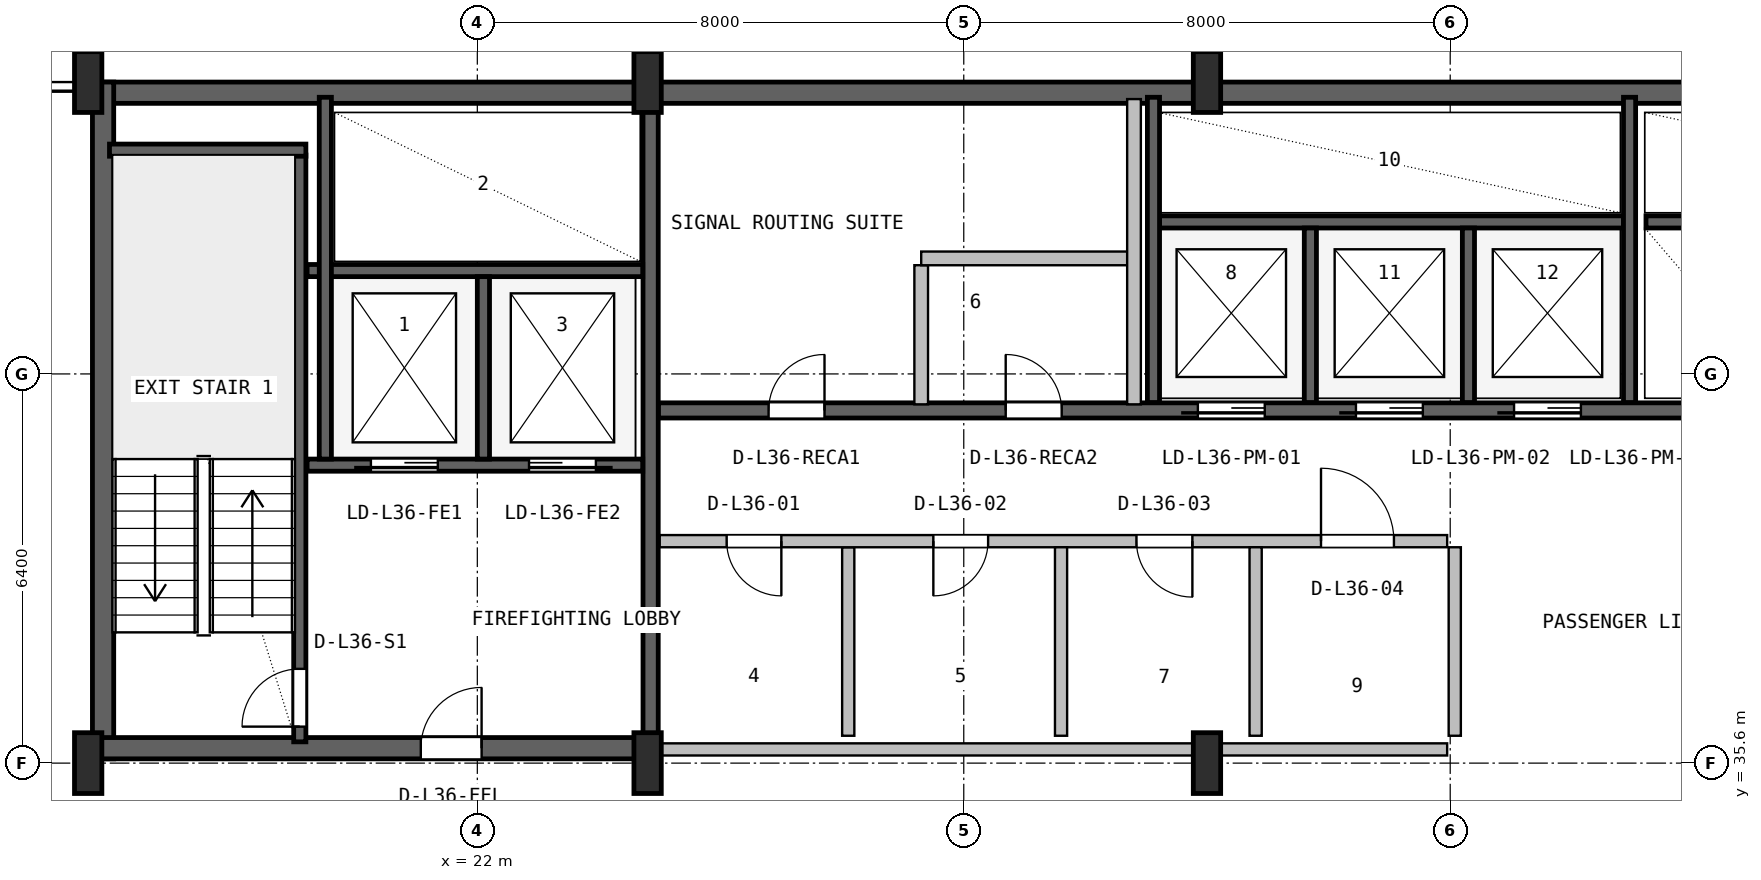
"""IFC4 building model, lengths in metres.
Left out: names, types, materials, properties, quantities, classifications, styles, units other than length and angle.
Written with IfcOpenShell. Run it as: python <this file> out.ifc"""

import sys

from ifc_helpers import new_model, si_unit, direction, frame, frame_2d, origin, origin_2d, place, context, subcontext, project, spatial, rectangle, i_section, extrude, source, transform, mapped, element, fill, save


model = new_model("IFC4")
c1 = context("Model", 3, precision=1e-05, world=origin(), true_north=direction((0.0, 1.0)))
c2 = subcontext(c1, "Body", "Model", "MODEL_VIEW")
j1 = project(units=[si_unit("LENGTHUNIT", "METRE"), si_unit("PLANEANGLEUNIT", "RADIAN")], contexts=[c1])
p1 = place(None, origin())
s1 = spatial("IfcSite", under=j1, at=p1, CompositionType="ELEMENT")
p2 = place(p1, origin())
s2 = spatial("IfcBuilding", under=s1, at=p2, CompositionType="ELEMENT")
p3 = place(p2, frame((0.0, 0.0, 149.6)))
s3 = spatial("IfcBuildingStorey", under=s2, at=p3, CompositionType="ELEMENT", Elevation=149.6)
p4 = place(p3, frame((15.6, 46.625, 0.0), z_axis=(0.0, 0.0, 1.0), x_axis=(1.0, 0.0, 0.0)))
e1 = element("IfcWall", 1, at=p4, inside=s3, PredefinedType="SHEAR", context=c2, shape_type="SweptSolid", body=[
    extrude(rectangle(XDim=36.8, YDim=0.35, at=frame_2d((18.4, 0.0))), origin(), (0.0, 0.0, 1.0), 3.55),
])
p5 = place(p3, frame((15.845, 35.67, 0.0), z_axis=(0.0, 0.0, 1.0), x_axis=(0.0, 1.0, 0.0)))
e2 = element("IfcWall", 2, at=p5, inside=s3, PredefinedType="SHEAR", context=c2, shape_type="SweptSolid", body=[
    extrude(rectangle(XDim=11.13, YDim=0.35, at=frame_2d((5.565, 0.0))), origin(), (0.0, 0.0, 1.0), 3.55),
])
p6 = place(p3, frame((15.67, 35.845, 0.0), z_axis=(0.0, 0.0, 1.0), x_axis=(1.0, 0.0, 0.0)))
e3 = element("IfcWall", 3, at=p6, inside=s3, PredefinedType="SHEAR", context=c2, shape_type="SweptSolid", body=[
    extrude(rectangle(XDim=9.13, YDim=0.35, at=frame_2d((4.565, 0.0))), origin(), (0.0, 0.0, 1.0), 3.55),
])
p7 = place(p6, frame((5.4, 0.0, 0.0)))
e4 = element("IfcOpeningElement", 4, at=p7, cuts=e3, PredefinedType="OPENING", context=c2, shape_type="SweptSolid", body=[
    extrude(rectangle(XDim=1.0, YDim=2.1, at=frame_2d((0.5, 1.05))), frame((0.0, 0.185, 0.0), z_axis=(0.0, -1.0, 0.0), x_axis=(1.0, 0.0, 0.0)), (0.0, 0.0, 1.0), 0.37),
])
m1 = source(origin(), c2, "Body", "SweptSolid", [
    extrude(i_section(OverallWidth=0.45, OverallDepth=1.0, WebThickness=0.016, FlangeThickness=0.03, FilletRadius=0.016, at=origin_2d()), origin(), (0.0, 0.0, 1.0), 3.8),
])
for number, where, z_axis, x_axis in (
    (5, (15.6, 35.6, 0.0), (0.0, 0.0, 1.0), (1.0, 0.0, 0.0)),
    (6, (15.6, 46.8, 0.0), (0.0, 0.0, 1.0), (1.0, 0.0, 0.0)),
    (7, (24.8, 35.6, 0.0), (0.0, 0.0, 1.0), (1.0, 0.0, 0.0)),
    (8, (24.8, 46.8, 0.0), (0.0, 0.0, 1.0), (1.0, 0.0, 0.0)),
    (9, (34.0, 35.6, 0.0), (0.0, 0.0, 1.0), (1.0, 0.0, 0.0)),
    (10, (34.0, 46.8, 0.0), (0.0, 0.0, 1.0), (1.0, 0.0, 0.0)),
):
    element("IfcColumn", number, at=place(p3, frame(where, z_axis=z_axis, x_axis=x_axis)), inside=s3, PredefinedType="COLUMN", context=c2, shape_type="MappedRepresentation", body=[
        mapped(m1, transform((0.0, 0.0, 0.0), x_axis=(1.0, 0.0, 0.0), y_axis=(0.0, 1.0, 0.0), z_axis=(0.0, 0.0, 1.0), scale=1.0)),
    ])
p8 = place(p3, frame((19.08, 35.95, 0.0), z_axis=(0.0, 0.0, 1.0), x_axis=(0.0, 1.0, 0.0)))
e11 = element("IfcWall", 11, at=p8, inside=s3, PredefinedType="SHEAR", context=c2, shape_type="SweptSolid", body=[
    extrude(rectangle(XDim=9.65, YDim=0.2, at=frame_2d((4.825, 0.0))), origin(), (0.0, 0.0, 1.0), 3.55),
])
p9 = place(p8, frame((0.25, 0.0, 0.0)))
e12 = element("IfcOpeningElement", 12, at=p9, cuts=e11, PredefinedType="OPENING", context=c2, shape_type="SweptSolid", body=[
    extrude(rectangle(XDim=0.95, YDim=2.1, at=frame_2d((0.475, 1.05))), frame((0.0, 0.11, 0.0), z_axis=(0.0, -1.0, 0.0), x_axis=(1.0, 0.0, 0.0)), (0.0, 0.0, 1.0), 0.22),
])
p10 = place(p3, frame((15.95, 45.68, 0.0), z_axis=(0.0, 0.0, 1.0), x_axis=(1.0, 0.0, 0.0)))
e13 = element("IfcWall", 13, at=p10, inside=s3, PredefinedType="SHEAR", context=c2, shape_type="SweptSolid", body=[
    extrude(rectangle(XDim=3.23, YDim=0.2, at=frame_2d((1.615, 0.0))), origin(), (0.0, 0.0, 1.0), 3.55),
])
p11 = place(p3, frame((24.85, 36.05, 0.0), z_axis=(0.0, 0.0, 1.0), x_axis=(0.0, 1.0, 0.0)))
e14 = element("IfcWall", 14, at=p11, inside=s3, PredefinedType="SHEAR", context=c2, shape_type="SweptSolid", body=[
    extrude(rectangle(XDim=10.45, YDim=0.25, at=frame_2d((5.225, 0.0))), origin(), (0.0, 0.0, 1.0), 3.55),
])
p12 = place(p3, frame((19.2, 40.5, 0.0), z_axis=(0.0, 0.0, 1.0), x_axis=(1.0, 0.0, 0.0)))
e15 = element("IfcWall", 15, at=p12, inside=s3, PredefinedType="SHEAR", context=c2, shape_type="SweptSolid", body=[
    extrude(rectangle(XDim=5.52, YDim=0.2, at=frame_2d((2.76, 0.0))), origin(), (0.0, 0.0, 1.0), 3.55),
])
p13 = place(p12, frame((1.05, 0.0, 0.0)))
e16 = element("IfcOpeningElement", 16, at=p13, cuts=e15, PredefinedType="OPENING", context=c2, shape_type="SweptSolid", body=[
    extrude(rectangle(XDim=1.1, YDim=2.18, at=frame_2d((0.55, 1.09))), frame((0.0, 0.11, 0.0), z_axis=(0.0, -1.0, 0.0), x_axis=(1.0, 0.0, 0.0)), (0.0, 0.0, 1.0), 0.22),
])
p14 = place(p12, frame((3.65, 0.0, 0.0)))
e17 = element("IfcOpeningElement", 17, at=p14, cuts=e15, PredefinedType="OPENING", context=c2, shape_type="SweptSolid", body=[
    extrude(rectangle(XDim=1.1, YDim=2.18, at=frame_2d((0.55, 1.09))), frame((0.0, 0.11, 0.0), z_axis=(0.0, -1.0, 0.0), x_axis=(1.0, 0.0, 0.0)), (0.0, 0.0, 1.0), 0.22),
])
p15 = place(p3, frame((19.2, 43.7, 0.0), z_axis=(0.0, 0.0, 1.0), x_axis=(1.0, 0.0, 0.0)))
e18 = element("IfcWall", 18, at=p15, inside=s3, PredefinedType="SHEAR", context=c2, shape_type="SweptSolid", body=[
    extrude(rectangle(XDim=5.52, YDim=0.2, at=frame_2d((2.76, 0.0))), origin(), (0.0, 0.0, 1.0), 3.55),
])
p16 = place(p3, frame((22.1, 40.6, 0.0), z_axis=(0.0, 0.0, 1.0), x_axis=(0.0, 1.0, 0.0)))
e19 = element("IfcWall", 19, at=p16, inside=s3, PredefinedType="SHEAR", context=c2, shape_type="SweptSolid", body=[
    extrude(rectangle(XDim=3.0, YDim=0.2, at=frame_2d((1.5, 0.0))), origin(), (0.0, 0.0, 1.0), 3.55),
])
p17 = place(p3, frame((19.5, 40.6, 0.0), z_axis=(0.0, 0.0, 1.0), x_axis=(0.0, 1.0, 0.0)))
e20 = element("IfcWall", 20, at=p17, inside=s3, PredefinedType="SHEAR", context=c2, shape_type="SweptSolid", body=[
    extrude(rectangle(XDim=5.95, YDim=0.2, at=frame_2d((2.975, 0.0))), origin(), (0.0, 0.0, 1.0), 3.55),
])
p18 = place(p3, frame((24.98, 41.4, 0.0), z_axis=(0.0, 0.0, 1.0), x_axis=(1.0, 0.0, 0.0)))
e21 = element("IfcWall", 21, at=p18, inside=s3, PredefinedType="SHEAR", context=c2, shape_type="SweptSolid", body=[
    extrude(rectangle(XDim=23.82, YDim=0.25, at=frame_2d((11.91, 0.0))), origin(), (0.0, 0.0, 1.0), 3.55),
])
p19 = place(p18, frame((8.87, 0.0, 0.0)))
e22 = element("IfcOpeningElement", 22, at=p19, cuts=e21, PredefinedType="OPENING", context=c2, shape_type="SweptSolid", body=[
    extrude(rectangle(XDim=1.1, YDim=2.18, at=frame_2d((0.55, 1.09))), frame((0.0, 0.135, 0.0), z_axis=(0.0, -1.0, 0.0), x_axis=(1.0, 0.0, 0.0)), (0.0, 0.0, 1.0), 0.27),
])
p20 = place(p18, frame((11.47, 0.0, 0.0)))
e23 = element("IfcOpeningElement", 23, at=p20, cuts=e21, PredefinedType="OPENING", context=c2, shape_type="SweptSolid", body=[
    extrude(rectangle(XDim=1.1, YDim=2.18, at=frame_2d((0.55, 1.09))), frame((0.0, 0.135, 0.0), z_axis=(0.0, -1.0, 0.0), x_axis=(1.0, 0.0, 0.0)), (0.0, 0.0, 1.0), 0.27),
])
p21 = place(p18, frame((14.07, 0.0, 0.0)))
e24 = element("IfcOpeningElement", 24, at=p21, cuts=e21, PredefinedType="OPENING", context=c2, shape_type="SweptSolid", body=[
    extrude(rectangle(XDim=1.1, YDim=2.18, at=frame_2d((0.55, 1.09))), frame((0.0, 0.135, 0.0), z_axis=(0.0, -1.0, 0.0), x_axis=(1.0, 0.0, 0.0)), (0.0, 0.0, 1.0), 0.27),
])
p22 = place(p18, frame((1.81, 0.0, 0.0)))
e25 = element("IfcOpeningElement", 25, at=p22, cuts=e21, PredefinedType="OPENING", context=c2, shape_type="SweptSolid", body=[
    extrude(rectangle(XDim=0.92, YDim=2.08, at=frame_2d((0.46, 1.04))), frame((0.0, 0.135, 0.0), z_axis=(0.0, -1.0, 0.0), x_axis=(1.0, 0.0, 0.0)), (0.0, 0.0, 1.0), 0.27),
])
p23 = place(p18, frame((5.71, 0.0, 0.0)))
e26 = element("IfcOpeningElement", 26, at=p23, cuts=e21, PredefinedType="OPENING", context=c2, shape_type="SweptSolid", body=[
    extrude(rectangle(XDim=0.92, YDim=2.08, at=frame_2d((0.46, 1.04))), frame((0.0, 0.135, 0.0), z_axis=(0.0, -1.0, 0.0), x_axis=(1.0, 0.0, 0.0)), (0.0, 0.0, 1.0), 0.27),
])
p24 = place(p3, frame((33.22, 44.5, 0.0), z_axis=(0.0, 0.0, 1.0), x_axis=(1.0, 0.0, 0.0)))
e27 = element("IfcWall", 27, at=p24, inside=s3, PredefinedType="SHEAR", context=c2, shape_type="SweptSolid", body=[
    extrude(rectangle(XDim=7.63, YDim=0.2, at=frame_2d((3.815, 0.0))), origin(), (0.0, 0.0, 1.0), 3.55),
])
p25 = place(p3, frame((33.12, 41.53, 0.0), z_axis=(0.0, 0.0, 1.0), x_axis=(0.0, 1.0, 0.0)))
e28 = element("IfcWall", 28, at=p25, inside=s3, PredefinedType="SHEAR", context=c2, shape_type="SweptSolid", body=[
    extrude(rectangle(XDim=5.02, YDim=0.2, at=frame_2d((2.51, 0.0))), origin(), (0.0, 0.0, 1.0), 3.55),
])
for number, where, z_axis, x_axis in (
    (29, (35.7, 41.53, 0.0), (0.0, 0.0, 1.0), (0.0, 1.0, 0.0)),
    (30, (38.3, 41.53, 0.0), (0.0, 0.0, 1.0), (0.0, 1.0, 0.0)),
):
    element("IfcWall", number, at=place(p3, frame(where, z_axis=z_axis, x_axis=x_axis)), inside=s3, PredefinedType="SHEAR", context=c2, shape_type="SweptSolid", body=[
        extrude(rectangle(XDim=2.87, YDim=0.2, at=frame_2d((1.435, 0.0))), origin(), (0.0, 0.0, 1.0), 3.55),
    ])
p26 = place(p3, frame((40.95, 41.53, 0.0), z_axis=(0.0, 0.0, 1.0), x_axis=(0.0, 1.0, 0.0)))
e31 = element("IfcWall", 31, at=p26, inside=s3, PredefinedType="SHEAR", context=c2, shape_type="SweptSolid", body=[
    extrude(rectangle(XDim=5.02, YDim=0.2, at=frame_2d((2.51, 0.0))), origin(), (0.0, 0.0, 1.0), 3.55),
])
p27 = place(p3, frame((41.22, 44.5, 0.0), z_axis=(0.0, 0.0, 1.0), x_axis=(1.0, 0.0, 0.0)))
e32 = element("IfcWall", 32, at=p27, inside=s3, PredefinedType="SHEAR", context=c2, shape_type="SweptSolid", body=[
    extrude(rectangle(XDim=7.58, YDim=0.2, at=frame_2d((3.79, 0.0))), origin(), (0.0, 0.0, 1.0), 3.55),
])
p28 = place(p3, frame((25.0, 35.825, 0.0), z_axis=(0.0, 0.0, 1.0), x_axis=(1.0, 0.0, 0.0)))
e33 = element("IfcWall", 33, at=p28, inside=s3, PredefinedType="SOLIDWALL", context=c2, shape_type="SweptSolid", body=[
    extrude(rectangle(XDim=12.95, YDim=0.2, at=frame_2d((6.475, 0.0))), origin(), (0.0, 0.0, 1.0), 2.575),
])
p29 = place(p3, frame((28.1, 36.05, 0.0), z_axis=(0.0, 0.0, 1.0), x_axis=(0.0, 1.0, 0.0)))
e34 = element("IfcWall", 34, at=p29, inside=s3, PredefinedType="PLUMBINGWALL", context=c2, shape_type="SweptSolid", body=[
    extrude(rectangle(XDim=3.1, YDim=0.2, at=frame_2d((1.55, 0.0))), origin(), (0.0, 0.0, 1.0), 3.53),
])
p30 = place(p3, frame((25.0, 39.25, 0.0), z_axis=(0.0, 0.0, 1.0), x_axis=(1.0, 0.0, 0.0)))
e35 = element("IfcWall", 35, at=p30, inside=s3, PredefinedType="SOLIDWALL", context=c2, shape_type="SweptSolid", body=[
    extrude(rectangle(XDim=12.95, YDim=0.2, at=frame_2d((6.475, 0.0))), origin(), (0.0, 0.0, 1.0), 3.53),
])
p31 = place(p30, frame((1.1, 0.0, 0.0)))
e36 = element("IfcOpeningElement", 36, at=p31, cuts=e35, PredefinedType="OPENING", context=c2, shape_type="SweptSolid", body=[
    extrude(rectangle(XDim=0.9, YDim=2.06, at=frame_2d((0.45, 1.03))), frame((0.0, 0.11, 0.0), z_axis=(0.0, -1.0, 0.0), x_axis=(1.0, 0.0, 0.0)), (0.0, 0.0, 1.0), 0.22),
])
p32 = place(p30, frame((4.5, 0.0, 0.0)))
e37 = element("IfcOpeningElement", 37, at=p32, cuts=e35, PredefinedType="OPENING", context=c2, shape_type="SweptSolid", body=[
    extrude(rectangle(XDim=0.9, YDim=2.06, at=frame_2d((0.45, 1.03))), frame((0.0, 0.11, 0.0), z_axis=(0.0, -1.0, 0.0), x_axis=(1.0, 0.0, 0.0)), (0.0, 0.0, 1.0), 0.22),
])
p33 = place(p30, frame((7.84, 0.0, 0.0)))
e38 = element("IfcOpeningElement", 38, at=p33, cuts=e35, PredefinedType="OPENING", context=c2, shape_type="SweptSolid", body=[
    extrude(rectangle(XDim=0.92, YDim=2.08, at=frame_2d((0.46, 1.04))), frame((0.0, 0.11, 0.0), z_axis=(0.0, -1.0, 0.0), x_axis=(1.0, 0.0, 0.0)), (0.0, 0.0, 1.0), 0.22),
])
p34 = place(p30, frame((10.875, 0.0, 0.0)))
e39 = element("IfcOpeningElement", 39, at=p34, cuts=e35, PredefinedType="OPENING", context=c2, shape_type="SweptSolid", body=[
    extrude(rectangle(XDim=1.2, YDim=2.1, at=frame_2d((0.6, 1.05))), frame((0.0, 0.11, 0.0), z_axis=(0.0, -1.0, 0.0), x_axis=(1.0, 0.0, 0.0)), (0.0, 0.0, 1.0), 0.22),
])
p35 = place(p3, frame((31.6, 36.05, 0.0), z_axis=(0.0, 0.0, 1.0), x_axis=(0.0, 1.0, 0.0)))
e40 = element("IfcWall", 40, at=p35, inside=s3, PredefinedType="PLUMBINGWALL", context=c2, shape_type="SweptSolid", body=[
    extrude(rectangle(XDim=3.1, YDim=0.2, at=frame_2d((1.55, 0.0))), origin(), (0.0, 0.0, 1.0), 3.53),
])
for number, where, z_axis, x_axis in (
    (41, (34.8, 36.05, 0.0), (0.0, 0.0, 1.0), (0.0, 1.0, 0.0)),
    (42, (38.075, 36.05, 0.0), (0.0, 0.0, 1.0), (0.0, 1.0, 0.0)),
):
    element("IfcWall", number, at=place(p3, frame(where, z_axis=z_axis, x_axis=x_axis)), inside=s3, PredefinedType="SOLIDWALL", context=c2, shape_type="SweptSolid", body=[
        extrude(rectangle(XDim=3.1, YDim=0.2, at=frame_2d((1.55, 0.0))), origin(), (0.0, 0.0, 1.0), 3.53),
    ])
p36 = place(p3, frame((29.3, 41.5, 0.0), z_axis=(0.0, 0.0, 1.0), x_axis=(0.0, 1.0, 0.0)))
e43 = element("IfcWall", 43, at=p36, inside=s3, PredefinedType="PARTITIONING", context=c2, shape_type="SweptSolid", body=[
    extrude(rectangle(XDim=2.288, YDim=0.225, at=frame_2d((1.144, 0.0))), origin(), (0.0, 0.0, 1.0), 3.53),
])
p37 = place(p3, frame((29.3, 43.9, 0.0), z_axis=(0.0, 0.0, 1.0), x_axis=(1.0, 0.0, 0.0)))
e44 = element("IfcWall", 44, at=p37, inside=s3, PredefinedType="PARTITIONING", context=c2, shape_type="SweptSolid", body=[
    extrude(rectangle(XDim=3.5, YDim=0.225, at=frame_2d((1.75, 0.0))), origin(), (0.0, 0.0, 1.0), 3.53),
])
p38 = place(p3, frame((32.8, 41.5, 0.0), z_axis=(0.0, 0.0, 1.0), x_axis=(0.0, 1.0, 0.0)))
e45 = element("IfcWall", 45, at=p38, inside=s3, PredefinedType="PARTITIONING", context=c2, shape_type="SweptSolid", body=[
    extrude(rectangle(XDim=5.02, YDim=0.225, at=frame_2d((2.51, 0.0))), origin(), (0.0, 0.0, 1.0), 3.53),
])
m2 = source(origin(), c2, "Body", "SweptSolid", [
    extrude(rectangle(XDim=0.95, YDim=2.1, at=frame_2d((0.475, 1.05))), frame((0.0, 0.025, 0.0), z_axis=(0.0, -1.0, 0.0), x_axis=(1.0, 0.0, 0.0)), (0.0, 0.0, 1.0), 0.05),
])
p39 = place(p9, origin())
e46 = element("IfcDoor", 46, at=p39, inside=s3, OperationType="SINGLE_SWING_LEFT", PredefinedType="DOOR", context=c2, shape_type="MappedRepresentation", body=[
    mapped(m2, transform((0.0, 0.0, 0.0), x_axis=(1.0, 0.0, 0.0), y_axis=(0.0, 1.0, 0.0), z_axis=(0.0, 0.0, 1.0), scale=1.0)),
])
fill(e12, e46)
m3 = source(origin(), c2, "Body", "SweptSolid", [
    extrude(rectangle(XDim=1.0, YDim=2.1, at=frame_2d((0.5, 1.05))), frame((0.0, 0.025, 0.0), z_axis=(0.0, -1.0, 0.0), x_axis=(1.0, 0.0, 0.0)), (0.0, 0.0, 1.0), 0.05),
])
p40 = place(p7, origin())
e47 = element("IfcDoor", 47, at=p40, inside=s3, OperationType="SINGLE_SWING_RIGHT", PredefinedType="DOOR", context=c2, shape_type="MappedRepresentation", body=[
    mapped(m3, transform((0.0, 0.0, 0.0), x_axis=(1.0, 0.0, 0.0), y_axis=(0.0, 1.0, 0.0), z_axis=(0.0, 0.0, 1.0), scale=1.0)),
])
fill(e4, e47)
m4 = source(origin(), c2, "Body", "SweptSolid", [
    extrude(rectangle(XDim=1.1, YDim=2.18, at=frame_2d((0.55, 1.09))), frame((0.0, 0.025, 0.0), z_axis=(0.0, -1.0, 0.0), x_axis=(1.0, 0.0, 0.0)), (0.0, 0.0, 1.0), 0.05),
])
p41 = place(p13, frame((1.1, 0.0, 0.0), z_axis=(0.0, 0.0, 1.0), x_axis=(-1.0, 0.0, 0.0)))
e48 = element("IfcDoor", 48, at=p41, inside=s3, OperationType="SLIDING_TO_LEFT", PredefinedType="DOOR", context=c2, shape_type="MappedRepresentation", body=[
    mapped(m4, transform((0.0, 0.0, 0.0), x_axis=(1.0, 0.0, 0.0), y_axis=(0.0, 1.0, 0.0), z_axis=(0.0, 0.0, 1.0), scale=1.0)),
])
fill(e16, e48)
p42 = place(p14, frame((1.1, 0.0, 0.0), z_axis=(0.0, 0.0, 1.0), x_axis=(-1.0, 0.0, 0.0)))
e49 = element("IfcDoor", 49, at=p42, inside=s3, OperationType="SLIDING_TO_RIGHT", PredefinedType="DOOR", context=c2, shape_type="MappedRepresentation", body=[
    mapped(m4, transform((0.0, 0.0, 0.0), x_axis=(1.0, 0.0, 0.0), y_axis=(0.0, 1.0, 0.0), z_axis=(0.0, 0.0, 1.0), scale=1.0)),
])
fill(e17, e49)
p43 = place(p19, frame((1.1, 0.0, 0.0), z_axis=(0.0, 0.0, 1.0), x_axis=(-1.0, 0.0, 0.0)))
e50 = element("IfcDoor", 50, at=p43, inside=s3, OperationType="SLIDING_TO_LEFT", PredefinedType="DOOR", context=c2, shape_type="MappedRepresentation", body=[
    mapped(m4, transform((0.0, 0.0, 0.0), x_axis=(1.0, 0.0, 0.0), y_axis=(0.0, 1.0, 0.0), z_axis=(0.0, 0.0, 1.0), scale=1.0)),
])
fill(e22, e50)
p44 = place(p20, frame((1.1, 0.0, 0.0), z_axis=(0.0, 0.0, 1.0), x_axis=(-1.0, 0.0, 0.0)))
e51 = element("IfcDoor", 51, at=p44, inside=s3, OperationType="SLIDING_TO_LEFT", PredefinedType="DOOR", context=c2, shape_type="MappedRepresentation", body=[
    mapped(m4, transform((0.0, 0.0, 0.0), x_axis=(1.0, 0.0, 0.0), y_axis=(0.0, 1.0, 0.0), z_axis=(0.0, 0.0, 1.0), scale=1.0)),
])
fill(e23, e51)
p45 = place(p21, frame((1.1, 0.0, 0.0), z_axis=(0.0, 0.0, 1.0), x_axis=(-1.0, 0.0, 0.0)))
e52 = element("IfcDoor", 52, at=p45, inside=s3, OperationType="SLIDING_TO_LEFT", PredefinedType="DOOR", context=c2, shape_type="MappedRepresentation", body=[
    mapped(m4, transform((0.0, 0.0, 0.0), x_axis=(1.0, 0.0, 0.0), y_axis=(0.0, 1.0, 0.0), z_axis=(0.0, 0.0, 1.0), scale=1.0)),
])
fill(e24, e52)
m5 = source(origin(), c2, "Body", "SweptSolid", [
    extrude(rectangle(XDim=0.92, YDim=2.08, at=frame_2d((0.46, 1.04))), frame((0.0, 0.025, 0.0), z_axis=(0.0, -1.0, 0.0), x_axis=(1.0, 0.0, 0.0)), (0.0, 0.0, 1.0), 0.05),
])
p46 = place(p22, origin())
e53 = element("IfcDoor", 53, at=p46, inside=s3, OperationType="SINGLE_SWING_RIGHT", PredefinedType="DOOR", context=c2, shape_type="MappedRepresentation", body=[
    mapped(m5, transform((0.0, 0.0, 0.0), x_axis=(1.0, 0.0, 0.0), y_axis=(0.0, 1.0, 0.0), z_axis=(0.0, 0.0, 1.0), scale=1.0)),
])
fill(e25, e53)
p47 = place(p23, origin())
e54 = element("IfcDoor", 54, at=p47, inside=s3, OperationType="SINGLE_SWING_LEFT", PredefinedType="DOOR", context=c2, shape_type="MappedRepresentation", body=[
    mapped(m5, transform((0.0, 0.0, 0.0), x_axis=(1.0, 0.0, 0.0), y_axis=(0.0, 1.0, 0.0), z_axis=(0.0, 0.0, 1.0), scale=1.0)),
])
fill(e26, e54)
m6 = source(origin(), c2, "Body", "SweptSolid", [
    extrude(rectangle(XDim=0.9, YDim=2.06, at=frame_2d((0.45, 1.03))), frame((0.0, 0.025, 0.0), z_axis=(0.0, -1.0, 0.0), x_axis=(1.0, 0.0, 0.0)), (0.0, 0.0, 1.0), 0.05),
])
p48 = place(p31, frame((0.9, 0.0, 0.0), z_axis=(0.0, 0.0, 1.0), x_axis=(-1.0, 0.0, 0.0)))
e55 = element("IfcDoor", 55, at=p48, inside=s3, OperationType="SINGLE_SWING_RIGHT", PredefinedType="DOOR", context=c2, shape_type="MappedRepresentation", body=[
    mapped(m6, transform((0.0, 0.0, 0.0), x_axis=(1.0, 0.0, 0.0), y_axis=(0.0, 1.0, 0.0), z_axis=(0.0, 0.0, 1.0), scale=1.0)),
])
fill(e36, e55)
p49 = place(p32, frame((0.9, 0.0, 0.0), z_axis=(0.0, 0.0, 1.0), x_axis=(-1.0, 0.0, 0.0)))
e56 = element("IfcDoor", 56, at=p49, inside=s3, OperationType="SINGLE_SWING_LEFT", PredefinedType="DOOR", context=c2, shape_type="MappedRepresentation", body=[
    mapped(m6, transform((0.0, 0.0, 0.0), x_axis=(1.0, 0.0, 0.0), y_axis=(0.0, 1.0, 0.0), z_axis=(0.0, 0.0, 1.0), scale=1.0)),
])
fill(e37, e56)
p50 = place(p33, frame((0.92, 0.0, 0.0), z_axis=(0.0, 0.0, 1.0), x_axis=(-1.0, 0.0, 0.0)))
e57 = element("IfcDoor", 57, at=p50, inside=s3, OperationType="SINGLE_SWING_RIGHT", PredefinedType="DOOR", context=c2, shape_type="MappedRepresentation", body=[
    mapped(m5, transform((0.0, 0.0, 0.0), x_axis=(1.0, 0.0, 0.0), y_axis=(0.0, 1.0, 0.0), z_axis=(0.0, 0.0, 1.0), scale=1.0)),
])
fill(e38, e57)
m7 = source(origin(), c2, "Body", "SweptSolid", [
    extrude(rectangle(XDim=1.2, YDim=2.1, at=frame_2d((0.6, 1.05))), frame((0.0, 0.025, 0.0), z_axis=(0.0, -1.0, 0.0), x_axis=(1.0, 0.0, 0.0)), (0.0, 0.0, 1.0), 0.05),
])
p51 = place(p34, origin())
e58 = element("IfcDoor", 58, at=p51, inside=s3, OperationType="SINGLE_SWING_LEFT", PredefinedType="DOOR", context=c2, shape_type="MappedRepresentation", body=[
    mapped(m7, transform((0.0, 0.0, 0.0), x_axis=(1.0, 0.0, 0.0), y_axis=(0.0, 1.0, 0.0), z_axis=(0.0, 0.0, 1.0), scale=1.0)),
])
fill(e39, e58)
save(model, sys.argv[1])
